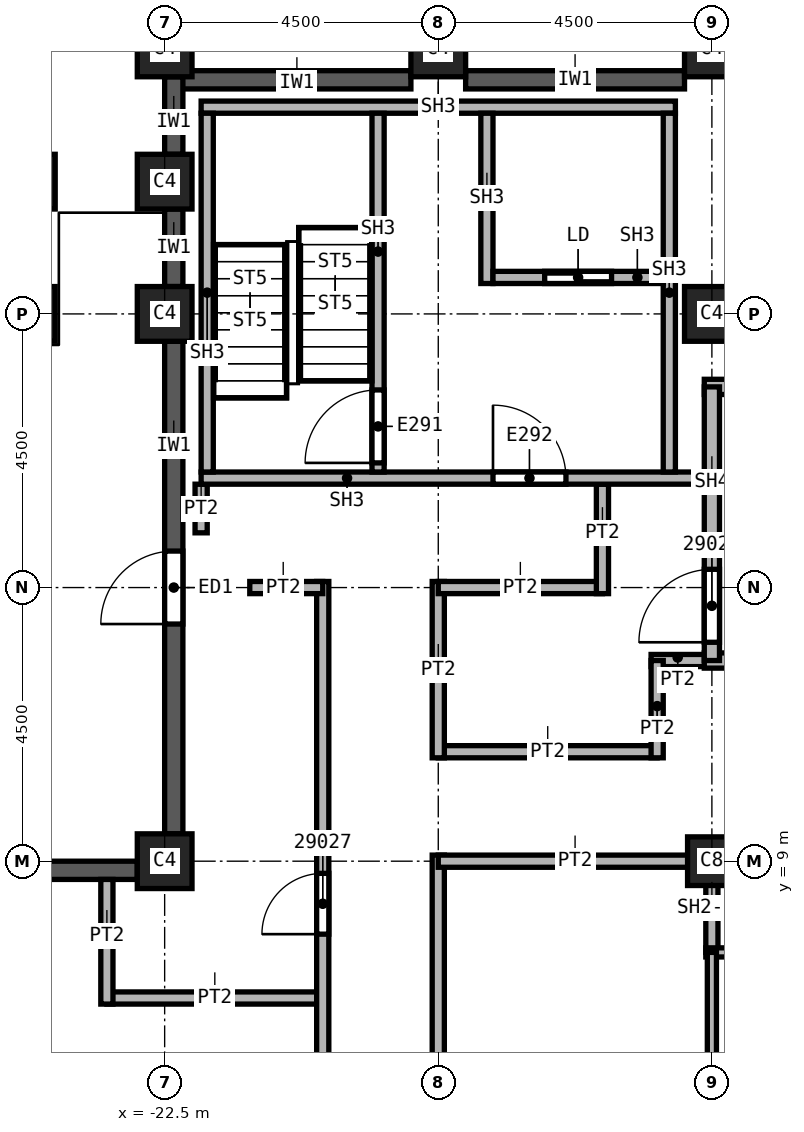
"""IFC4 building model, lengths in metres.
Left out: names, types, materials, properties, quantities, classifications, styles, units other than length and angle.
Written with IfcOpenShell. Run it as: python <this file> out.ifc"""

import sys

from ifc_helpers import new_model, si_unit, direction, frame, frame_2d, origin, origin_2d, place, context, subcontext, project, spatial, rectangle, extrude, element, fill, save


model = new_model("IFC4")
c1 = context("Model", 3, precision=1e-05, world=origin(), true_north=direction((0.0, 1.0)))
c2 = subcontext(c1, "Body", "Model", "MODEL_VIEW")
j1 = project(units=[si_unit("LENGTHUNIT", "METRE"), si_unit("PLANEANGLEUNIT", "RADIAN")], contexts=[c1])
p1 = place(None, origin())
s1 = spatial("IfcSite", under=j1, at=p1, CompositionType="ELEMENT")
p2 = place(p1, origin())
s2 = spatial("IfcBuilding", under=s1, at=p2, CompositionType="ELEMENT")
p3 = place(p2, frame((0.0, 0.0, 294.0)))
s3 = spatial("IfcBuildingStorey", under=s2, at=p3, CompositionType="ELEMENT", Elevation=294.0)
for number, where, z_axis, x_axis in (
    (1, (-13.5, 18.0, 0.0), (0.0, 0.0, 1.0), (1.0, 0.0, 0.0)),
    (2, (-22.5, 9.0, 0.0), (0.0, 0.0, 1.0), (1.0, 0.0, 0.0)),
    (3, (-22.5, 18.0, 0.0), (0.0, 0.0, 1.0), (1.0, 0.0, 0.0)),
):
    element("IfcColumn", number, at=place(p3, frame(where, z_axis=z_axis, x_axis=x_axis)), inside=s3, PredefinedType="COLUMN", context=c2, shape_type="SweptSolid", body=[
        extrude(rectangle(XDim=0.9, YDim=0.9, at=origin_2d()), origin(), (0.0, 0.0, 1.0), 5.74),
    ])
p4 = place(p3, frame((-13.5, 9.0, 0.0), z_axis=(0.0, 0.0, 1.0), x_axis=(1.0, 0.0, 0.0)))
e4 = element("IfcColumn", 4, at=p4, inside=s3, PredefinedType="COLUMN", context=c2, shape_type="SweptSolid", body=[
    extrude(rectangle(XDim=0.8, YDim=0.8, at=origin_2d()), origin(), (0.0, 0.0, 1.0), 5.74),
])
for number, where, z_axis, x_axis in (
    (5, (-13.5, 22.35, 0.0), (0.0, 0.18, 0.984), (-1.0, 0.0, 0.0)),
    (6, (-18.0, 22.35, 0.0), (0.0, 0.18, 0.984), (-1.0, 0.0, 0.0)),
    (7, (-22.5, 22.35, 0.0), (0.0, 0.18, 0.984), (-1.0, 0.0, 0.0)),
):
    element("IfcColumn", number, at=place(p3, frame(where, z_axis=z_axis, x_axis=x_axis)), inside=s3, PredefinedType="COLUMN", context=c2, shape_type="SweptSolid", body=[
        extrude(rectangle(XDim=0.9, YDim=0.9, at=origin_2d()), origin(), (0.0, 0.0, 1.0), 5.835),
    ])
p5 = place(p3, frame((-22.5, 20.175, 0.0), z_axis=(0.0, 0.091066578773, 0.995844806298), x_axis=(-1.0, 0.0, 0.0)))
e8 = element("IfcColumn", 8, at=p5, inside=s3, PredefinedType="COLUMN", context=c2, shape_type="SweptSolid", body=[
    extrude(rectangle(XDim=0.9, YDim=0.9, at=origin_2d()), origin(), (0.0, 0.0, 1.0), 5.764),
])
p6 = place(p3, frame((-24.75, 20.175, 0.0), z_axis=(0.0, 0.087792514157, 0.99613878273), x_axis=(-1.0, 0.0, 0.0)))
e9 = element("IfcColumn", 9, at=p6, inside=s3, PredefinedType="COLUMN", context=c2, shape_type="SweptSolid", body=[
    extrude(rectangle(XDim=0.9, YDim=0.9, at=origin_2d()), origin(), (0.0, 0.0, 1.0), 5.979),
])
p7 = place(p3, frame((-24.75, 18.0, 0.0), z_axis=(0.0, 0.0, 1.0), x_axis=(1.0, 0.0, 0.0)))
e10 = element("IfcColumn", 10, at=p7, inside=s3, PredefinedType="COLUMN", context=c2, shape_type="SweptSolid", body=[
    extrude(rectangle(XDim=0.9, YDim=0.9, at=origin_2d()), origin(), (0.0, 0.0, 1.0), 6.0),
])
p8 = place(p3, frame((-13.95, 21.85, 0.0), z_axis=(0.0, 0.0, 1.0), x_axis=(-1.0, 0.0, 0.0)))
e11 = element("IfcWall", 11, at=p8, inside=s3, PredefinedType="SOLIDWALL", context=c2, shape_type="SweptSolid", body=[
    extrude(rectangle(XDim=3.6, YDim=0.3, at=frame_2d((1.8, 0.0))), origin(), (0.0, 0.0, 1.0), 5.14),
])
p9 = place(p3, frame((-18.45, 21.85, 0.0), z_axis=(0.0, 0.0, 1.0), x_axis=(-1.0, 0.0, 0.0)))
e12 = element("IfcWall", 12, at=p9, inside=s3, PredefinedType="SOLIDWALL", context=c2, shape_type="SweptSolid", body=[
    extrude(rectangle(XDim=3.8, YDim=0.3, at=frame_2d((1.9, 0.0))), origin(), (0.0, 0.0, 1.0), 5.14),
])
p10 = place(p3, frame((-22.35, 9.45, 0.0), z_axis=(0.0, 0.0, 1.0), x_axis=(0.0, 1.0, 0.0)))
e13 = element("IfcWall", 13, at=p10, inside=s3, PredefinedType="SOLIDWALL", context=c2, shape_type="SweptSolid", body=[
    extrude(rectangle(XDim=8.1, YDim=0.3, at=frame_2d((4.05, 0.0))), origin(), (0.0, 0.0, 1.0), 5.14),
])
p11 = place(p10, frame((3.45, 0.0, 0.0)))
e14 = element("IfcOpeningElement", 14, at=p11, cuts=e13, PredefinedType="OPENING", context=c2, shape_type="SweptSolid", body=[
    extrude(rectangle(XDim=1.2, YDim=2.4, at=frame_2d((0.6, 1.2))), frame((0.0, 0.15, 0.0), z_axis=(0.0, -1.0, 0.0), x_axis=(1.0, 0.0, 0.0)), (0.0, 0.0, 1.0), 0.3),
])
p12 = place(p3, frame((-22.35, 19.725, 0.0), z_axis=(0.0, 0.0, 1.0), x_axis=(0.0, -1.0, 0.0)))
e15 = element("IfcWall", 15, at=p12, inside=s3, PredefinedType="SOLIDWALL", context=c2, shape_type="SweptSolid", body=[
    extrude(rectangle(XDim=1.275, YDim=0.3, at=frame_2d((0.638, 0.0))), origin(), (0.0, 0.0, 1.0), 5.14),
])
p13 = place(p3, frame((-22.35, 21.9, 0.0), z_axis=(0.0, 0.0, 1.0), x_axis=(0.0, -1.0, 0.0)))
e16 = element("IfcWall", 16, at=p13, inside=s3, PredefinedType="SOLIDWALL", context=c2, shape_type="SweptSolid", body=[
    extrude(rectangle(XDim=1.275, YDim=0.3, at=frame_2d((0.637, 0.0))), origin(), (0.0, 0.0, 1.0), 5.14),
])
p14 = place(p3, frame((-22.95, 8.85, 0.0), z_axis=(0.0, 0.0, 1.0), x_axis=(-1.0, 0.0, 0.0)))
e17 = element("IfcWall", 17, at=p14, inside=s3, PredefinedType="SOLIDWALL", context=c2, shape_type="SweptSolid", body=[
    extrude(rectangle(XDim=3.6, YDim=0.3, at=frame_2d((1.8, 0.0))), origin(), (0.0, 0.0, 1.0), 5.14),
])
p15 = place(p3, frame((-23.45, 6.75, 0.0), z_axis=(0.0, 0.0, 1.0), x_axis=(1.0, 0.0, 0.0)))
e18 = element("IfcWall", 18, at=p15, inside=s3, PredefinedType="PARTITIONING", context=c2, shape_type="SweptSolid", body=[
    extrude(rectangle(XDim=3.55, YDim=0.2, at=frame_2d((1.775, 0.0))), origin(), (0.0, 0.0, 1.0), 5.74),
])
p16 = place(p3, frame((-23.45, 8.7, 0.0), z_axis=(0.0, 0.0, 1.0), x_axis=(0.0, -1.0, 0.0)))
e19 = element("IfcWall", 19, at=p16, inside=s3, PredefinedType="PARTITIONING", context=c2, shape_type="SweptSolid", body=[
    extrude(rectangle(XDim=2.05, YDim=0.2, at=frame_2d((1.025, 0.0))), origin(), (0.0, 0.0, 1.0), 5.74),
])
p17 = place(p3, frame((-21.9, 14.4, 0.0), z_axis=(0.0, 0.0, 1.0), x_axis=(0.0, 1.0, 0.0)))
e20 = element("IfcWall", 20, at=p17, inside=s3, PredefinedType="PARTITIONING", context=c2, shape_type="SweptSolid", body=[
    extrude(rectangle(XDim=0.8, YDim=0.2, at=frame_2d((0.4, 0.0))), origin(), (0.0, 0.0, 1.0), 5.74),
])
p18 = place(p3, frame((-19.9, -21.7, 0.0), z_axis=(0.0, 0.0, 1.0), x_axis=(0.0, 1.0, 0.0)))
e21 = element("IfcWall", 21, at=p18, inside=s3, PredefinedType="PARTITIONING", context=c2, shape_type="SweptSolid", body=[
    extrude(rectangle(XDim=35.3, YDim=0.2, at=frame_2d((17.65, 0.0))), origin(), (0.0, 0.0, 1.0), 5.74),
])
p19 = place(p18, frame((23.65, 0.0, 0.0)))
e22 = element("IfcOpeningElement", 22, at=p19, cuts=e21, PredefinedType="OPENING", context=c2, shape_type="SweptSolid", body=[
    extrude(rectangle(XDim=1.0, YDim=2.1, at=frame_2d((0.5, 1.05))), frame((0.0, 0.1, 0.0), z_axis=(0.0, -1.0, 0.0), x_axis=(1.0, 0.0, 0.0)), (0.0, 0.0, 1.0), 0.2),
])
p20 = place(p18, frame((29.5, 0.0, 0.0)))
e23 = element("IfcOpeningElement", 23, at=p20, cuts=e21, PredefinedType="OPENING", context=c2, shape_type="SweptSolid", body=[
    extrude(rectangle(XDim=1.0, YDim=2.1, at=frame_2d((0.5, 1.05))), frame((0.0, 0.1, 0.0), z_axis=(0.0, -1.0, 0.0), x_axis=(1.0, 0.0, 0.0)), (0.0, 0.0, 1.0), 0.2),
])
p21 = place(p18, frame((0.25, 0.0, 0.0)))
e24 = element("IfcOpeningElement", 24, at=p21, cuts=e21, PredefinedType="OPENING", context=c2, shape_type="SweptSolid", body=[
    extrude(rectangle(XDim=1.0, YDim=2.1, at=frame_2d((0.5, 1.05))), frame((0.0, 0.1, 0.0), z_axis=(0.0, -1.0, 0.0), x_axis=(1.0, 0.0, 0.0)), (0.0, 0.0, 1.0), 0.2),
])
p22 = place(p18, frame((16.15, 0.0, 0.0)))
e25 = element("IfcOpeningElement", 25, at=p22, cuts=e21, PredefinedType="OPENING", context=c2, shape_type="SweptSolid", body=[
    extrude(rectangle(XDim=1.0, YDim=2.1, at=frame_2d((0.5, 1.05))), frame((0.0, 0.1, 0.0), z_axis=(0.0, -1.0, 0.0), x_axis=(1.0, 0.0, 0.0)), (0.0, 0.0, 1.0), 0.2),
])
p23 = place(p3, frame((-19.9, 13.5, 0.0), z_axis=(0.0, 0.0, 1.0), x_axis=(-1.0, 0.0, 0.0)))
e26 = element("IfcWall", 26, at=p23, inside=s3, PredefinedType="PARTITIONING", context=c2, shape_type="SweptSolid", body=[
    extrude(rectangle(XDim=1.2, YDim=0.2, at=frame_2d((0.6, 0.0))), origin(), (0.0, 0.0, 1.0), 5.74),
])
p24 = place(p3, frame((-18.0, 9.1, 0.0), z_axis=(0.0, 0.0, 1.0), x_axis=(0.0, -1.0, 0.0)))
e27 = element("IfcWall", 27, at=p24, inside=s3, PredefinedType="PARTITIONING", context=c2, shape_type="SweptSolid", body=[
    extrude(rectangle(XDim=18.2, YDim=0.2, at=frame_2d((9.1, 0.0))), origin(), (0.0, 0.0, 1.0), 5.74),
])
p25 = place(p24, frame((16.3, 0.0, 0.0)))
e28 = element("IfcOpeningElement", 28, at=p25, cuts=e27, PredefinedType="OPENING", context=c2, shape_type="SweptSolid", body=[
    extrude(rectangle(XDim=1.0, YDim=2.1, at=frame_2d((0.5, 1.05))), frame((0.0, 0.1, 0.0), z_axis=(0.0, -1.0, 0.0), x_axis=(1.0, 0.0, 0.0)), (0.0, 0.0, 1.0), 0.2),
])
p26 = place(p24, frame((6.4, 0.0, 0.0)))
e29 = element("IfcOpeningElement", 29, at=p26, cuts=e27, PredefinedType="OPENING", context=c2, shape_type="SweptSolid", body=[
    extrude(rectangle(XDim=1.0, YDim=2.1, at=frame_2d((0.5, 1.05))), frame((0.0, 0.1, 0.0), z_axis=(0.0, -1.0, 0.0), x_axis=(1.0, 0.0, 0.0)), (0.0, 0.0, 1.0), 0.2),
])
p27 = place(p3, frame((-18.0, 10.8, 0.0), z_axis=(0.0, 0.0, 1.0), x_axis=(1.0, 0.0, 0.0)))
e30 = element("IfcWall", 30, at=p27, inside=s3, PredefinedType="PARTITIONING", context=c2, shape_type="SweptSolid", body=[
    extrude(rectangle(XDim=3.6, YDim=0.2, at=frame_2d((1.8, 0.0))), origin(), (0.0, 0.0, 1.0), 5.74),
])
p28 = place(p3, frame((-18.0, 13.6, 0.0), z_axis=(0.0, 0.0, 1.0), x_axis=(0.0, -1.0, 0.0)))
e31 = element("IfcWall", 31, at=p28, inside=s3, PredefinedType="PARTITIONING", context=c2, shape_type="SweptSolid", body=[
    extrude(rectangle(XDim=2.9, YDim=0.2, at=frame_2d((1.45, 0.0))), origin(), (0.0, 0.0, 1.0), 5.74),
])
p29 = place(p3, frame((-15.3, 13.5, 0.0), z_axis=(0.0, 0.0, 1.0), x_axis=(-1.0, 0.0, 0.0)))
e32 = element("IfcWall", 32, at=p29, inside=s3, PredefinedType="PARTITIONING", context=c2, shape_type="SweptSolid", body=[
    extrude(rectangle(XDim=2.7, YDim=0.2, at=frame_2d((1.35, 0.0))), origin(), (0.0, 0.0, 1.0), 5.74),
])
p30 = place(p3, frame((-15.3, 15.2, 0.0), z_axis=(0.0, 0.0, 1.0), x_axis=(0.0, -1.0, 0.0)))
e33 = element("IfcWall", 33, at=p30, inside=s3, PredefinedType="PARTITIONING", context=c2, shape_type="SweptSolid", body=[
    extrude(rectangle(XDim=1.8, YDim=0.2, at=frame_2d((0.9, 0.0))), origin(), (0.0, 0.0, 1.0), 5.74),
])
p31 = place(p3, frame((-14.5, 12.3, 0.0), z_axis=(0.0, 0.0, 1.0), x_axis=(1.0, 0.0, 0.0)))
e34 = element("IfcWall", 34, at=p31, inside=s3, PredefinedType="PARTITIONING", context=c2, shape_type="SweptSolid", body=[
    extrude(rectangle(XDim=1.125, YDim=0.2, at=frame_2d((0.562, 0.0))), origin(), (0.0, 0.0, 1.0), 5.74),
])
p32 = place(p3, frame((-13.5, 9.0, 0.0), z_axis=(0.0, 0.0, 1.0), x_axis=(-1.0, 0.0, 0.0)))
e35 = element("IfcWall", 35, at=p32, inside=s3, PredefinedType="PARTITIONING", context=c2, shape_type="SweptSolid", body=[
    extrude(rectangle(XDim=4.5, YDim=0.2, at=frame_2d((2.25, 0.0))), origin(), (0.0, 0.0, 1.0), 5.74),
])
p33 = place(p3, frame((-14.4, 10.7, 0.0), z_axis=(0.0, 0.0, 1.0), x_axis=(0.0, 1.0, 0.0)))
e36 = element("IfcWall", 36, at=p33, inside=s3, PredefinedType="PARTITIONING", context=c2, shape_type="SweptSolid", body=[
    extrude(rectangle(XDim=1.6, YDim=0.2, at=frame_2d((0.8, 0.0))), origin(), (0.0, 0.0, 1.0), 5.74),
])
p34 = place(p3, frame((-13.6, 9.0, 0.0), z_axis=(0.0, 0.0, 1.0), x_axis=(1.0, 0.0, 0.0)))
e37 = element("IfcWall", 37, at=p34, inside=s3, PredefinedType="SOLIDWALL", context=c2, shape_type="SweptSolid", body=[
    extrude(rectangle(XDim=3.1, YDim=0.2, at=frame_2d((1.55, 0.0))), origin(), (0.0, 0.0, 1.0), 5.062),
])
p35 = place(p34, frame((0.85, 0.0, 0.0)))
e38 = element("IfcOpeningElement", 38, at=p35, cuts=e37, PredefinedType="OPENING", context=c2, shape_type="SweptSolid", body=[
    extrude(rectangle(XDim=1.1, YDim=2.1, at=frame_2d((0.55, 1.05))), frame((0.0, 0.1, 0.0), z_axis=(0.0, -1.0, 0.0), x_axis=(1.0, 0.0, 0.0)), (0.0, 0.0, 1.0), 0.2),
])
p36 = place(p3, frame((-13.5, 7.5, 0.0), z_axis=(0.0, 0.0, 1.0), x_axis=(0.0, 1.0, 0.0)))
e39 = element("IfcWall", 39, at=p36, inside=s3, PredefinedType="SOLIDWALL", context=c2, shape_type="SweptSolid", body=[
    extrude(rectangle(XDim=1.6, YDim=0.2, at=frame_2d((0.8, 0.0))), origin(), (0.0, 0.0, 1.0), 5.062),
])
p37 = place(p3, frame((-13.625, 12.3, 0.0), z_axis=(0.0, 0.0, 1.0), x_axis=(1.0, 0.0, 0.0)))
e40 = element("IfcWall", 40, at=p37, inside=s3, PredefinedType="SOLIDWALL", context=c2, shape_type="SweptSolid", body=[
    extrude(rectangle(XDim=9.25, YDim=0.25, at=frame_2d((4.625, 0.0))), origin(), (0.0, 0.0, 1.0), 5.74),
])
p38 = place(p37, frame((0.85, 0.0, 0.0)))
e41 = element("IfcOpeningElement", 41, at=p38, cuts=e40, PredefinedType="OPENING", context=c2, shape_type="SweptSolid", body=[
    extrude(rectangle(XDim=1.2, YDim=2.1, at=frame_2d((0.6, 1.05))), frame((0.0, 0.125, 0.0), z_axis=(0.0, -1.0, 0.0), x_axis=(1.0, 0.0, 0.0)), (0.0, 0.0, 1.0), 0.25),
])
p39 = place(p3, frame((-13.625, 16.8, 0.0), z_axis=(0.0, 0.0, 1.0), x_axis=(1.0, 0.0, 0.0)))
e42 = element("IfcWall", 42, at=p39, inside=s3, PredefinedType="SOLIDWALL", context=c2, shape_type="SweptSolid", body=[
    extrude(rectangle(XDim=9.25, YDim=0.25, at=frame_2d((4.625, 0.0))), origin(), (0.0, 0.0, 1.0), 5.74),
])
p40 = place(p3, frame((-13.5, 12.3, 0.0), z_axis=(0.0, 0.0, 1.0), x_axis=(0.0, 1.0, 0.0)))
e43 = element("IfcWall", 43, at=p40, inside=s3, PredefinedType="SOLIDWALL", context=c2, shape_type="SweptSolid", body=[
    extrude(rectangle(XDim=4.5, YDim=0.25, at=frame_2d((2.25, 0.0))), origin(), (0.0, 0.0, 1.0), 5.74),
])
p41 = place(p40, frame((0.3, 0.0, 0.0)))
e44 = element("IfcOpeningElement", 44, at=p41, cuts=e43, PredefinedType="OPENING", context=c2, shape_type="SweptSolid", body=[
    extrude(rectangle(XDim=1.2, YDim=2.1, at=frame_2d((0.6, 1.05))), frame((0.0, 0.125, 0.0), z_axis=(0.0, -1.0, 0.0), x_axis=(1.0, 0.0, 0.0)), (0.0, 0.0, 1.0), 0.25),
])
p42 = place(p3, frame((-13.6, 7.5, 0.0), z_axis=(0.0, 0.0, 1.0), x_axis=(1.0, 0.0, 0.0)))
e45 = element("IfcWall", 45, at=p42, inside=s3, PredefinedType="PARTITIONING", context=c2, shape_type="SweptSolid", body=[
    extrude(rectangle(XDim=3.1, YDim=0.15, at=frame_2d((1.55, 0.0))), origin(), (0.0, 0.0, 1.0), 5.74),
])
p43 = place(p3, frame((-13.5, 3.0, 0.0), z_axis=(0.0, 0.0, 1.0), x_axis=(0.0, 1.0, 0.0)))
e46 = element("IfcWall", 46, at=p43, inside=s3, PredefinedType="PARTITIONING", context=c2, shape_type="SweptSolid", body=[
    extrude(rectangle(XDim=4.5, YDim=0.15, at=frame_2d((2.25, 0.0))), origin(), (0.0, 0.0, 1.0), 5.062),
])
p44 = place(p3, frame((-21.9, 15.3, 0.0), z_axis=(0.0, 0.0, 1.0), x_axis=(1.0, 0.0, 0.0)))
e47 = element("IfcWall", 47, at=p44, inside=s3, PredefinedType="SOLIDWALL", context=c2, shape_type="SweptSolid", body=[
    extrude(rectangle(XDim=8.275, YDim=0.2, at=frame_2d((4.137, 0.0))), origin(), (0.0, 0.0, 1.0), 5.74),
])
p45 = place(p44, frame((4.8, 0.0, 0.0)))
e48 = element("IfcOpeningElement", 48, at=p45, cuts=e47, PredefinedType="OPENING", context=c2, shape_type="SweptSolid", body=[
    extrude(rectangle(XDim=1.2, YDim=2.1, at=frame_2d((0.6, 1.05))), frame((0.0, 0.1, 0.0), z_axis=(0.0, -1.0, 0.0), x_axis=(1.0, 0.0, 0.0)), (0.0, 0.0, 1.0), 0.2),
])
p46 = place(p3, frame((-21.9, 21.4, 0.0), z_axis=(0.0, 0.0, 1.0), x_axis=(1.0, 0.0, 0.0)))
e49 = element("IfcWall", 49, at=p46, inside=s3, PredefinedType="SOLIDWALL", context=c2, shape_type="SweptSolid", body=[
    extrude(rectangle(XDim=7.8, YDim=0.2, at=frame_2d((3.9, 0.0))), origin(), (0.0, 0.0, 1.0), 5.74),
])
for number, where, z_axis, x_axis in (
    (50, (-21.8, 15.4, 0.0), (0.0, 0.0, 1.0), (0.0, 1.0, 0.0)),
    (51, (-14.2, 15.4, 0.0), (0.0, 0.0, 1.0), (0.0, 1.0, 0.0)),
):
    element("IfcWall", number, at=place(p3, frame(where, z_axis=z_axis, x_axis=x_axis)), inside=s3, PredefinedType="SOLIDWALL", context=c2, shape_type="SweptSolid", body=[
        extrude(rectangle(XDim=5.9, YDim=0.2, at=frame_2d((2.95, 0.0))), origin(), (0.0, 0.0, 1.0), 5.74),
    ])
p47 = place(p3, frame((-18.99, 15.4, 0.0), z_axis=(0.0, 0.0, 1.0), x_axis=(0.0, 1.0, 0.0)))
e52 = element("IfcWall", 52, at=p47, inside=s3, PredefinedType="SOLIDWALL", context=c2, shape_type="SweptSolid", body=[
    extrude(rectangle(XDim=5.9, YDim=0.2, at=frame_2d((2.95, 0.0))), origin(), (0.0, 0.0, 1.0), 5.74),
])
p48 = place(p47, frame((0.15, 0.0, 0.0)))
e53 = element("IfcOpeningElement", 53, at=p48, cuts=e52, PredefinedType="OPENING", context=c2, shape_type="SweptSolid", body=[
    extrude(rectangle(XDim=1.2, YDim=2.1, at=frame_2d((0.6, 1.05))), frame((0.0, 0.1, 0.0), z_axis=(0.0, -1.0, 0.0), x_axis=(1.0, 0.0, 0.0)), (0.0, 0.0, 1.0), 0.2),
])
p49 = place(p3, frame((-17.2, 18.5, 0.0), z_axis=(0.0, 0.0, 1.0), x_axis=(0.0, 1.0, 0.0)))
e54 = element("IfcWall", 54, at=p49, inside=s3, PredefinedType="SOLIDWALL", context=c2, shape_type="SweptSolid", body=[
    extrude(rectangle(XDim=2.8, YDim=0.2, at=frame_2d((1.4, 0.0))), origin(), (0.0, 0.0, 1.0), 5.74),
])
p50 = place(p3, frame((-17.1, 18.6, 0.0), z_axis=(0.0, 0.0, 1.0), x_axis=(1.0, 0.0, 0.0)))
e55 = element("IfcWall", 55, at=p50, inside=s3, PredefinedType="SOLIDWALL", context=c2, shape_type="SweptSolid", body=[
    extrude(rectangle(XDim=2.8, YDim=0.2, at=frame_2d((1.4, 0.0))), origin(), (0.0, 0.0, 1.0), 5.74),
])
p51 = place(p50, frame((0.85, 0.0, 0.0)))
e56 = element("IfcOpeningElement", 56, at=p51, cuts=e55, PredefinedType="OPENING", context=c2, shape_type="SweptSolid", body=[
    extrude(rectangle(XDim=1.1, YDim=2.1, at=frame_2d((0.55, 1.05))), frame((0.0, 0.1, 0.0), z_axis=(0.0, -1.0, 0.0), x_axis=(1.0, 0.0, 0.0)), (0.0, 0.0, 1.0), 0.2),
])
p52 = place(p11, origin())
e57 = element("IfcDoor", 57, at=p52, inside=s3, OperationType="SINGLE_SWING_LEFT", PredefinedType="DOOR", context=c2, shape_type="SweptSolid", body=[
    extrude(rectangle(XDim=1.2, YDim=2.4, at=frame_2d((0.6, 1.2))), frame((0.0, 0.025, 0.0), z_axis=(0.0, -1.0, 0.0), x_axis=(1.0, 0.0, 0.0)), (0.0, 0.0, 1.0), 0.05),
])
fill(e14, e57)
p53 = place(p41, origin())
e58 = element("IfcDoor", 58, at=p53, inside=s3, OperationType="SINGLE_SWING_LEFT", PredefinedType="DOOR", context=c2, shape_type="SweptSolid", body=[
    extrude(rectangle(XDim=1.2, YDim=2.1, at=frame_2d((0.6, 1.05))), frame((0.0, 0.025, 0.0), z_axis=(0.0, -1.0, 0.0), x_axis=(1.0, 0.0, 0.0)), (0.0, 0.0, 1.0), 0.05),
])
fill(e44, e58)
p54 = place(p20, origin())
e59 = element("IfcDoor", 59, at=p54, inside=s3, OperationType="SINGLE_SWING_RIGHT", PredefinedType="DOOR", context=c2, shape_type="SweptSolid", body=[
    extrude(rectangle(XDim=1.0, YDim=2.1, at=frame_2d((0.5, 1.05))), frame((0.0, 0.025, 0.0), z_axis=(0.0, -1.0, 0.0), x_axis=(1.0, 0.0, 0.0)), (0.0, 0.0, 1.0), 0.05),
])
fill(e23, e59)
p55 = place(p48, origin())
e60 = element("IfcDoor", 60, at=p55, inside=s3, OperationType="SINGLE_SWING_LEFT", PredefinedType="DOOR", context=c2, shape_type="SweptSolid", body=[
    extrude(rectangle(XDim=1.2, YDim=2.1, at=frame_2d((0.6, 1.05))), frame((0.0, 0.025, 0.0), z_axis=(0.0, -1.0, 0.0), x_axis=(1.0, 0.0, 0.0)), (0.0, 0.0, 1.0), 0.05),
])
fill(e53, e60)
p56 = place(p51, origin())
e61 = element("IfcDoor", 61, at=p56, inside=s3, OperationType="SLIDING_TO_LEFT", PredefinedType="DOOR", context=c2, shape_type="SweptSolid", body=[
    extrude(rectangle(XDim=1.1, YDim=2.1, at=frame_2d((0.55, 1.05))), frame((0.0, 0.025, 0.0), z_axis=(0.0, -1.0, 0.0), x_axis=(1.0, 0.0, 0.0)), (0.0, 0.0, 1.0), 0.05),
])
fill(e56, e61)
p57 = place(p45, origin())
e62 = element("IfcDoor", 62, at=p57, inside=s3, OperationType="SINGLE_SWING_RIGHT", PredefinedType="DOOR", context=c2, shape_type="SweptSolid", body=[
    extrude(rectangle(XDim=1.2, YDim=2.1, at=frame_2d((0.6, 1.05))), frame((0.0, 0.025, 0.0), z_axis=(0.0, -1.0, 0.0), x_axis=(1.0, 0.0, 0.0)), (0.0, 0.0, 1.0), 0.05),
])
fill(e48, e62)
save(model, sys.argv[1])
